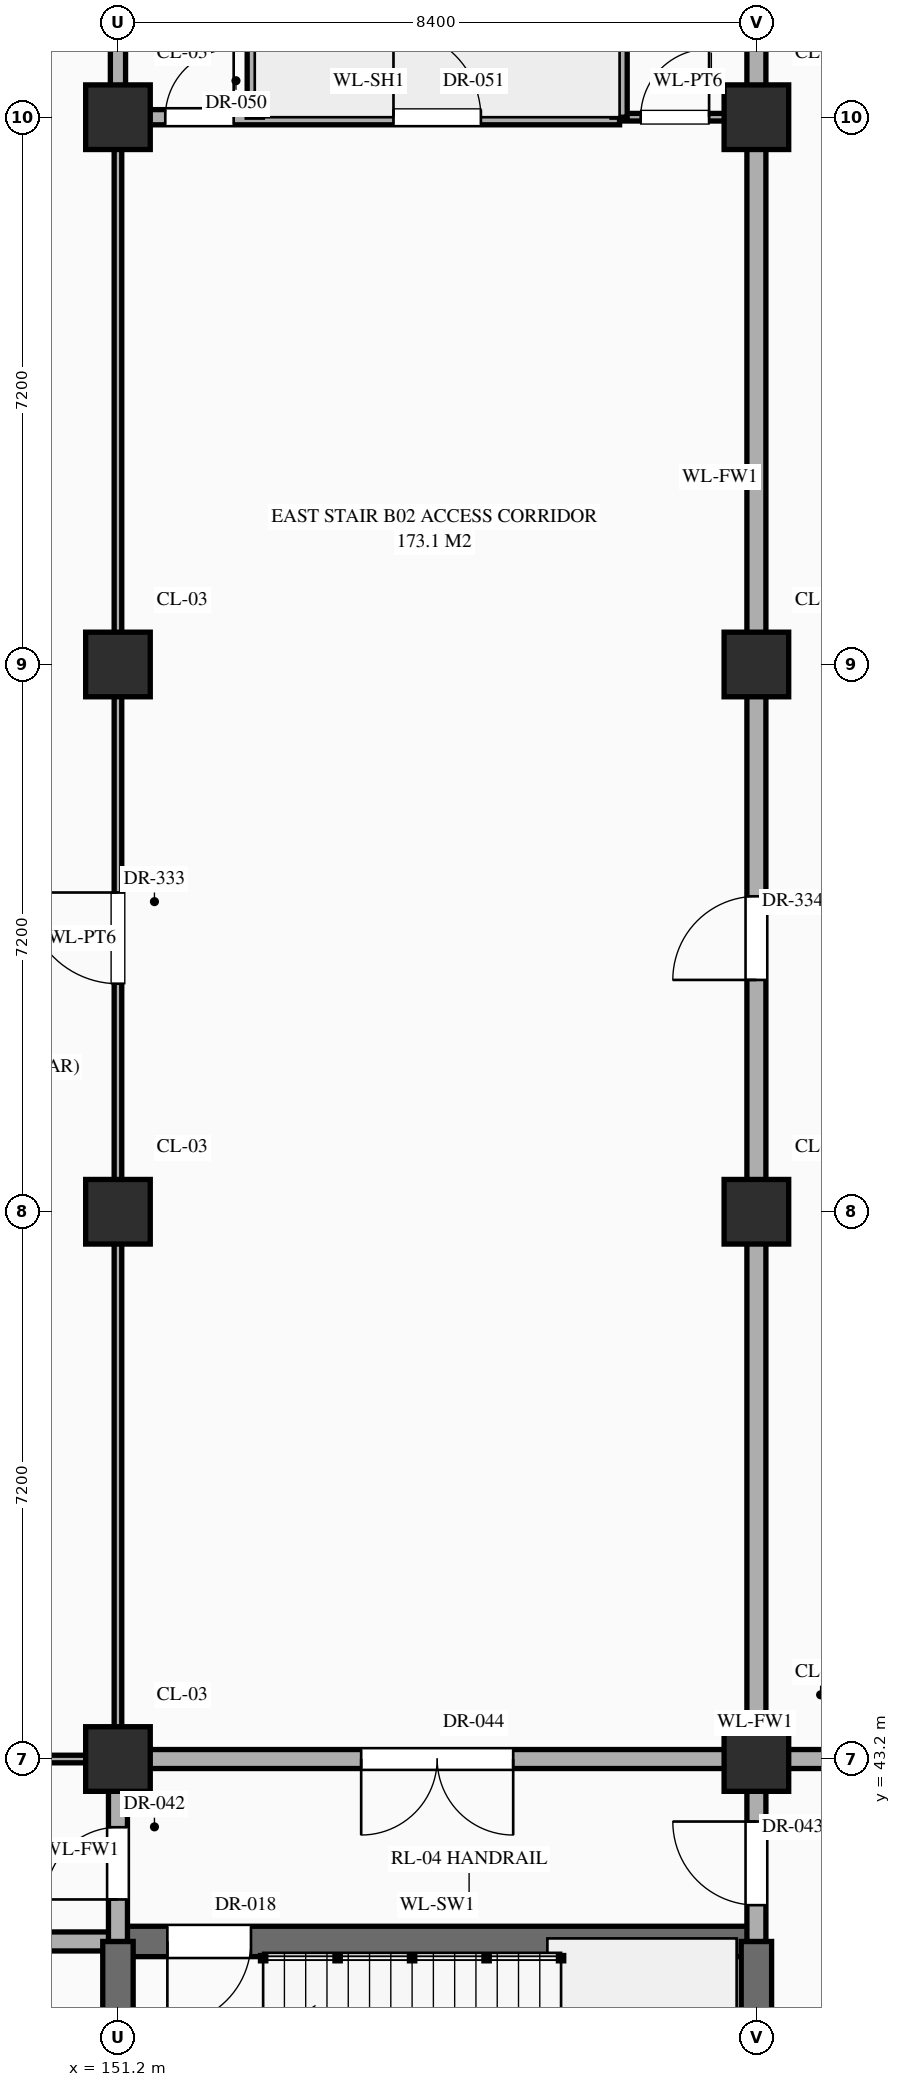
"""IFC4 building model, lengths in metres.
Left out: names, types, materials, properties, quantities, classifications, styles, units other than length and angle.
Written with IfcOpenShell. Run it as: python <this file> out.ifc"""

import sys

from ifc_helpers import new_model, si_unit, direction, frame, frame_2d, origin, origin_2d, place, context, subcontext, project, spatial, rectangle, extrude, element, fill, save


model = new_model("IFC4")
c1 = context("Model", 3, precision=1e-05, world=origin(), true_north=direction((0.0, 1.0)))
c2 = subcontext(c1, "Body", "Model", "MODEL_VIEW")
j1 = project(units=[si_unit("LENGTHUNIT", "METRE"), si_unit("PLANEANGLEUNIT", "RADIAN")], contexts=[c1])
p1 = place(None, origin())
s1 = spatial("IfcSite", under=j1, at=p1, CompositionType="ELEMENT")
p2 = place(p1, origin())
s2 = spatial("IfcBuilding", under=s1, at=p2, CompositionType="ELEMENT")
p3 = place(p2, frame((0.0, 0.0, -10.2)))
s3 = spatial("IfcBuildingStorey", under=s2, at=p3, CompositionType="ELEMENT", Elevation=-10.2)
for number, where, z_axis, x_axis in (
    (1, (151.2, 43.2, 0.0), (0.0, 0.0, 1.0), (1.0, 0.0, 0.0)),
    (2, (151.2, 50.4, 0.0), (0.0, 0.0, 1.0), (1.0, 0.0, 0.0)),
    (3, (151.2, 57.6, 0.0), (0.0, 0.0, 1.0), (1.0, 0.0, 0.0)),
    (4, (151.2, 64.8, 0.0), (0.0, 0.0, 1.0), (1.0, 0.0, 0.0)),
    (5, (159.6, 43.2, 0.0), (0.0, 0.0, 1.0), (1.0, 0.0, 0.0)),
    (6, (159.6, 50.4, 0.0), (0.0, 0.0, 1.0), (1.0, 0.0, 0.0)),
    (7, (159.6, 57.6, 0.0), (0.0, 0.0, 1.0), (1.0, 0.0, 0.0)),
    (8, (159.6, 64.8, 0.0), (0.0, 0.0, 1.0), (1.0, 0.0, 0.0)),
):
    element("IfcColumn", number, at=place(p3, frame(where, z_axis=z_axis, x_axis=x_axis)), inside=s3, PredefinedType="COLUMN", context=c2, shape_type="SweptSolid", body=[
        extrude(rectangle(XDim=0.85, YDim=0.85, at=origin_2d()), origin(), (0.0, 0.0, 1.0), 4.8),
    ])
p4 = place(p3, frame((81.2, 40.8, 0.0), z_axis=(0.0, 0.0, 1.0), x_axis=(1.0, 0.0, 0.0)))
e9 = element("IfcWall", 9, at=p4, inside=s3, PredefinedType="STANDARD", context=c2, shape_type="SweptSolid", body=[
    extrude(rectangle(XDim=70.0, YDim=0.25, at=frame_2d((35.0, 0.0))), origin(), (0.0, 0.0, 1.0), 4.48),
])
p5 = place(p4, frame((34.45, 0.0, 0.0)))
e10 = element("IfcOpeningElement", 10, at=p5, cuts=e9, PredefinedType="OPENING", context=c2, shape_type="SweptSolid", body=[
    extrude(rectangle(XDim=1.1, YDim=2.2, at=frame_2d((0.55, 1.1))), frame((0.0, 0.137, 0.0), z_axis=(0.0, -1.0, 0.0), x_axis=(1.0, 0.0, 0.0)), (0.0, 0.0, 1.0), 0.274),
])
p6 = place(p3, frame((151.2, 40.8, 0.0), z_axis=(0.0, 0.0, 1.0), x_axis=(1.0, 0.0, 0.0)))
e11 = element("IfcWall", 11, at=p6, inside=s3, PredefinedType="SHEAR", context=c2, shape_type="SweptSolid", body=[
    extrude(rectangle(XDim=8.4, YDim=0.4, at=frame_2d((4.2, 0.0))), origin(), (0.0, 0.0, 1.0), 4.48),
])
p7 = place(p6, frame((0.65, 0.0, 0.0)))
e12 = element("IfcOpeningElement", 12, at=p7, cuts=e11, PredefinedType="OPENING", context=c2, shape_type="SweptSolid", body=[
    extrude(rectangle(XDim=1.1, YDim=2.2, at=frame_2d((0.55, 1.1))), frame((0.0, 0.212, 0.0), z_axis=(0.0, -1.0, 0.0), x_axis=(1.0, 0.0, 0.0)), (0.0, 0.0, 1.0), 0.424),
])
p8 = place(p3, frame((117.6, 43.2, 0.0), z_axis=(0.0, 0.0, 1.0), x_axis=(1.0, 0.0, 0.0)))
e13 = element("IfcWall", 13, at=p8, inside=s3, PredefinedType="STANDARD", context=c2, shape_type="SweptSolid", body=[
    extrude(rectangle(XDim=33.6, YDim=0.1, at=frame_2d((16.8, 0.0))), origin(), (0.0, 0.0, 1.0), 3.63),
])
p9 = place(p8, frame((3.66, 0.0, 0.0)))
e14 = element("IfcOpeningElement", 14, at=p9, cuts=e13, PredefinedType="OPENING", context=c2, shape_type="SweptSolid", body=[
    extrude(rectangle(XDim=1.08, YDim=2.25, at=frame_2d((0.54, 1.125))), frame((0.0, 0.062, 0.0), z_axis=(0.0, -1.0, 0.0), x_axis=(1.0, 0.0, 0.0)), (0.0, 0.0, 1.0), 0.124),
])
p10 = place(p3, frame((151.2, 43.2, 0.0), z_axis=(0.0, 0.0, 1.0), x_axis=(1.0, 0.0, 0.0)))
e15 = element("IfcWall", 15, at=p10, inside=s3, PredefinedType="STANDARD", context=c2, shape_type="SweptSolid", body=[
    extrude(rectangle(XDim=16.76, YDim=0.25, at=frame_2d((8.38, 0.0))), origin(), (0.0, 0.0, 1.0), 3.63),
])
p11 = place(p10, frame((3.2, 0.0, 0.0)))
e16 = element("IfcOpeningElement", 16, at=p11, cuts=e15, PredefinedType="OPENING", context=c2, shape_type="SweptSolid", body=[
    extrude(rectangle(XDim=2.0, YDim=2.4, at=frame_2d((1.0, 1.2))), frame((0.0, 0.137, 0.0), z_axis=(0.0, -1.0, 0.0), x_axis=(1.0, 0.0, 0.0)), (0.0, 0.0, 1.0), 0.274),
])
p12 = place(p3, frame((151.2, 64.8, 0.0), z_axis=(0.0, 0.0, 1.0), x_axis=(1.0, 0.0, 0.0)))
e17 = element("IfcWall", 17, at=p12, inside=s3, PredefinedType="STANDARD", context=c2, shape_type="SweptSolid", body=[
    extrude(rectangle(XDim=6.6, YDim=0.2, at=frame_2d((3.3, 0.0))), origin(), (0.0, 0.0, 1.0), 3.63),
])
p13 = place(p12, frame((0.623, 0.0, 0.0)))
e18 = element("IfcOpeningElement", 18, at=p13, cuts=e17, PredefinedType="OPENING", context=c2, shape_type="SweptSolid", body=[
    extrude(rectangle(XDim=0.9, YDim=2.1, at=frame_2d((0.45, 1.05))), frame((0.0, 0.112, 0.0), z_axis=(0.0, -1.0, 0.0), x_axis=(1.0, 0.0, 0.0)), (0.0, 0.0, 1.0), 0.224),
])
p14 = place(p12, frame((3.625, 0.0, 0.0)))
e19 = element("IfcOpeningElement", 19, at=p14, cuts=e17, PredefinedType="OPENING", context=c2, shape_type="SweptSolid", body=[
    extrude(rectangle(XDim=1.15, YDim=2.25, at=frame_2d((0.575, 1.125))), frame((0.0, 0.112, 0.0), z_axis=(0.0, -1.0, 0.0), x_axis=(1.0, 0.0, 0.0)), (0.0, 0.0, 1.0), 0.224),
])
p15 = place(p3, frame((157.8, 64.8, 0.0), z_axis=(0.0, 0.0, 1.0), x_axis=(1.0, 0.0, 0.0)))
e20 = element("IfcWall", 20, at=p15, inside=s3, PredefinedType="STANDARD", context=c2, shape_type="SweptSolid", body=[
    extrude(rectangle(XDim=1.8, YDim=0.1, at=frame_2d((0.9, 0.0))), origin(), (0.0, 0.0, 1.0), 3.63),
])
p16 = place(p15, frame((0.278, 0.0, 0.0)))
e21 = element("IfcOpeningElement", 21, at=p16, cuts=e20, PredefinedType="OPENING", context=c2, shape_type="SweptSolid", body=[
    extrude(rectangle(XDim=0.9, YDim=2.15, at=frame_2d((0.45, 1.075))), frame((0.0, 0.062, 0.0), z_axis=(0.0, -1.0, 0.0), x_axis=(1.0, 0.0, 0.0)), (0.0, 0.0, 1.0), 0.124),
])
p17 = place(p3, frame((151.2, 36.0, 0.0), z_axis=(0.0, 0.0, 1.0), x_axis=(0.0, 1.0, 0.0)))
e22 = element("IfcWall", 22, at=p17, inside=s3, PredefinedType="SHEAR", context=c2, shape_type="SweptSolid", body=[
    extrude(rectangle(XDim=4.8, YDim=0.4, at=frame_2d((2.4, 0.0))), origin(), (0.0, 0.0, 1.0), 4.48),
])
p18 = place(p3, frame((151.2, 40.8, 0.0), z_axis=(0.0, 0.0, 1.0), x_axis=(0.0, 1.0, 0.0)))
e23 = element("IfcWall", 23, at=p18, inside=s3, PredefinedType="STANDARD", context=c2, shape_type="SweptSolid", body=[
    extrude(rectangle(XDim=2.4, YDim=0.25, at=frame_2d((1.2, 0.0))), origin(), (0.0, 0.0, 1.0), 3.73),
])
p19 = place(p18, frame((0.552, 0.0, 0.0)))
e24 = element("IfcOpeningElement", 24, at=p19, cuts=e23, PredefinedType="OPENING", context=c2, shape_type="SweptSolid", body=[
    extrude(rectangle(XDim=0.95, YDim=2.15, at=frame_2d((0.475, 1.075))), frame((0.0, 0.137, 0.0), z_axis=(0.0, -1.0, 0.0), x_axis=(1.0, 0.0, 0.0)), (0.0, 0.0, 1.0), 0.274),
])
p20 = place(p3, frame((151.2, 43.2, 0.0), z_axis=(0.0, 0.0, 1.0), x_axis=(0.0, 1.0, 0.0)))
e25 = element("IfcWall", 25, at=p20, inside=s3, PredefinedType="STANDARD", context=c2, shape_type="SweptSolid", body=[
    extrude(rectangle(XDim=21.6, YDim=0.1, at=frame_2d((10.8, 0.0))), origin(), (0.0, 0.0, 1.0), 3.73),
])
p21 = place(p20, frame((10.2, 0.0, 0.0)))
e26 = element("IfcOpeningElement", 26, at=p21, cuts=e25, PredefinedType="OPENING", context=c2, shape_type="SweptSolid", body=[
    extrude(rectangle(XDim=1.2, YDim=2.35, at=frame_2d((0.6, 1.175))), frame((0.0, 0.062, 0.0), z_axis=(0.0, -1.0, 0.0), x_axis=(1.0, 0.0, 0.0)), (0.0, 0.0, 1.0), 0.124),
])
p22 = place(p3, frame((151.2, 64.8, 0.0), z_axis=(0.0, 0.0, 1.0), x_axis=(0.0, 1.0, 0.0)))
e27 = element("IfcWall", 27, at=p22, inside=s3, PredefinedType="STANDARD", context=c2, shape_type="SweptSolid", body=[
    extrude(rectangle(XDim=21.6, YDim=0.2, at=frame_2d((10.8, 0.0))), origin(), (0.0, 0.0, 1.0), 3.73),
])
for number, where, z_axis, x_axis in (
    (28, (153.0, 64.8, 0.0), (0.0, 0.0, 1.0), (0.0, 1.0, 0.0)),
    (29, (157.8, 64.8, 0.0), (0.0, 0.0, 1.0), (0.0, 1.0, 0.0)),
):
    element("IfcWall", number, at=place(p3, frame(where, z_axis=z_axis, x_axis=x_axis)), inside=s3, PredefinedType="STANDARD", context=c2, shape_type="SweptSolid", body=[
        extrude(rectangle(XDim=43.2, YDim=0.2, at=frame_2d((21.6, 0.0))), origin(), (0.0, 0.0, 1.0), 4.48),
    ])
p23 = place(p3, frame((159.6, 36.0, 0.0), z_axis=(0.0, 0.0, 1.0), x_axis=(0.0, 1.0, 0.0)))
e30 = element("IfcWall", 30, at=p23, inside=s3, PredefinedType="SHEAR", context=c2, shape_type="SweptSolid", body=[
    extrude(rectangle(XDim=4.8, YDim=0.4, at=frame_2d((2.4, 0.0))), origin(), (0.0, 0.0, 1.0), 4.48),
])
p24 = place(p3, frame((159.6, 40.8, 0.0), z_axis=(0.0, 0.0, 1.0), x_axis=(0.0, 1.0, 0.0)))
e31 = element("IfcWall", 31, at=p24, inside=s3, PredefinedType="STANDARD", context=c2, shape_type="SweptSolid", body=[
    extrude(rectangle(XDim=43.2, YDim=0.25, at=frame_2d((21.6, 0.0))), origin(), (0.0, 0.0, 1.0), 3.73),
])
p25 = place(p24, frame((0.478, 0.0, 0.0)))
e32 = element("IfcOpeningElement", 32, at=p25, cuts=e31, PredefinedType="OPENING", context=c2, shape_type="SweptSolid", body=[
    extrude(rectangle(XDim=1.1, YDim=2.2, at=frame_2d((0.55, 1.1))), frame((0.0, 0.137, 0.0), z_axis=(0.0, -1.0, 0.0), x_axis=(1.0, 0.0, 0.0)), (0.0, 0.0, 1.0), 0.274),
])
p26 = place(p24, frame((40.472, 0.0, 0.0)))
e33 = element("IfcOpeningElement", 33, at=p26, cuts=e31, PredefinedType="OPENING", context=c2, shape_type="SweptSolid", body=[
    extrude(rectangle(XDim=1.0, YDim=2.2, at=frame_2d((0.5, 1.1))), frame((0.0, 0.137, 0.0), z_axis=(0.0, -1.0, 0.0), x_axis=(1.0, 0.0, 0.0)), (0.0, 0.0, 1.0), 0.274),
])
p27 = place(p24, frame((27.05, 0.0, 0.0)))
e34 = element("IfcOpeningElement", 34, at=p27, cuts=e31, PredefinedType="OPENING", context=c2, shape_type="SweptSolid", body=[
    extrude(rectangle(XDim=1.1, YDim=2.2, at=frame_2d((0.55, 1.1))), frame((0.0, 0.137, 0.0), z_axis=(0.0, -1.0, 0.0), x_axis=(1.0, 0.0, 0.0)), (0.0, 0.0, 1.0), 0.274),
])
p28 = place(p24, frame((12.65, 0.0, 0.0)))
e35 = element("IfcOpeningElement", 35, at=p28, cuts=e31, PredefinedType="OPENING", context=c2, shape_type="SweptSolid", body=[
    extrude(rectangle(XDim=1.1, YDim=2.2, at=frame_2d((0.55, 1.1))), frame((0.0, 0.137, 0.0), z_axis=(0.0, -1.0, 0.0), x_axis=(1.0, 0.0, 0.0)), (0.0, 0.0, 1.0), 0.274),
])
p29 = place(p7, frame((1.1, 0.0, 0.0), z_axis=(0.0, 0.0, 1.0), x_axis=(-1.0, 0.0, 0.0)))
e36 = element("IfcDoor", 36, at=p29, inside=s3, OperationType="SINGLE_SWING_RIGHT", PredefinedType="DOOR", context=c2, shape_type="SweptSolid", body=[
    extrude(rectangle(XDim=1.1, YDim=2.2, at=frame_2d((0.55, 1.1))), frame((0.0, 0.025, 0.0), z_axis=(0.0, -1.0, 0.0), x_axis=(1.0, 0.0, 0.0)), (0.0, 0.0, 1.0), 0.05),
])
fill(e12, e36)
p30 = place(p19, origin())
e37 = element("IfcDoor", 37, at=p30, inside=s3, OperationType="SINGLE_SWING_LEFT", PredefinedType="DOOR", context=c2, shape_type="SweptSolid", body=[
    extrude(rectangle(XDim=0.95, YDim=2.15, at=frame_2d((0.475, 1.075))), frame((0.0, 0.025, 0.0), z_axis=(0.0, -1.0, 0.0), x_axis=(1.0, 0.0, 0.0)), (0.0, 0.0, 1.0), 0.05),
])
fill(e24, e37)
p31 = place(p25, origin())
e38 = element("IfcDoor", 38, at=p31, inside=s3, OperationType="SINGLE_SWING_RIGHT", PredefinedType="DOOR", context=c2, shape_type="SweptSolid", body=[
    extrude(rectangle(XDim=1.1, YDim=2.2, at=frame_2d((0.55, 1.1))), frame((0.0, 0.025, 0.0), z_axis=(0.0, -1.0, 0.0), x_axis=(1.0, 0.0, 0.0)), (0.0, 0.0, 1.0), 0.05),
])
fill(e32, e38)
p32 = place(p11, frame((2.0, 0.0, 0.0), z_axis=(0.0, 0.0, 1.0), x_axis=(-1.0, 0.0, 0.0)))
e39 = element("IfcDoor", 39, at=p32, inside=s3, OperationType="DOUBLE_DOOR_SINGLE_SWING", PredefinedType="DOOR", context=c2, shape_type="SweptSolid", body=[
    extrude(rectangle(XDim=2.0, YDim=2.4, at=frame_2d((1.0, 1.2))), frame((0.0, 0.025, 0.0), z_axis=(0.0, -1.0, 0.0), x_axis=(1.0, 0.0, 0.0)), (0.0, 0.0, 1.0), 0.05),
])
fill(e16, e39)
p33 = place(p13, origin())
e40 = element("IfcDoor", 40, at=p33, inside=s3, OperationType="SINGLE_SWING_RIGHT", PredefinedType="DOOR", context=c2, shape_type="SweptSolid", body=[
    extrude(rectangle(XDim=0.9, YDim=2.1, at=frame_2d((0.45, 1.05))), frame((0.0, 0.025, 0.0), z_axis=(0.0, -1.0, 0.0), x_axis=(1.0, 0.0, 0.0)), (0.0, 0.0, 1.0), 0.05),
])
fill(e18, e40)
p34 = place(p14, origin())
e41 = element("IfcDoor", 41, at=p34, inside=s3, OperationType="SINGLE_SWING_LEFT", PredefinedType="DOOR", context=c2, shape_type="SweptSolid", body=[
    extrude(rectangle(XDim=1.15, YDim=2.25, at=frame_2d((0.575, 1.125))), frame((0.0, 0.025, 0.0), z_axis=(0.0, -1.0, 0.0), x_axis=(1.0, 0.0, 0.0)), (0.0, 0.0, 1.0), 0.05),
])
fill(e19, e41)
p35 = place(p16, origin())
e42 = element("IfcDoor", 42, at=p35, inside=s3, OperationType="SINGLE_SWING_RIGHT", PredefinedType="DOOR", context=c2, shape_type="SweptSolid", body=[
    extrude(rectangle(XDim=0.9, YDim=2.15, at=frame_2d((0.45, 1.075))), frame((0.0, 0.025, 0.0), z_axis=(0.0, -1.0, 0.0), x_axis=(1.0, 0.0, 0.0)), (0.0, 0.0, 1.0), 0.05),
])
fill(e21, e42)
p36 = place(p21, origin())
e43 = element("IfcDoor", 43, at=p36, inside=s3, OperationType="SINGLE_SWING_RIGHT", PredefinedType="DOOR", context=c2, shape_type="SweptSolid", body=[
    extrude(rectangle(XDim=1.2, YDim=2.35, at=frame_2d((0.6, 1.175))), frame((0.0, 0.025, 0.0), z_axis=(0.0, -1.0, 0.0), x_axis=(1.0, 0.0, 0.0)), (0.0, 0.0, 1.0), 0.05),
])
fill(e26, e43)
p37 = place(p28, origin())
e44 = element("IfcDoor", 44, at=p37, inside=s3, OperationType="SINGLE_SWING_LEFT", PredefinedType="DOOR", context=c2, shape_type="SweptSolid", body=[
    extrude(rectangle(XDim=1.1, YDim=2.2, at=frame_2d((0.55, 1.1))), frame((0.0, 0.025, 0.0), z_axis=(0.0, -1.0, 0.0), x_axis=(1.0, 0.0, 0.0)), (0.0, 0.0, 1.0), 0.05),
])
fill(e35, e44)
save(model, sys.argv[1])
